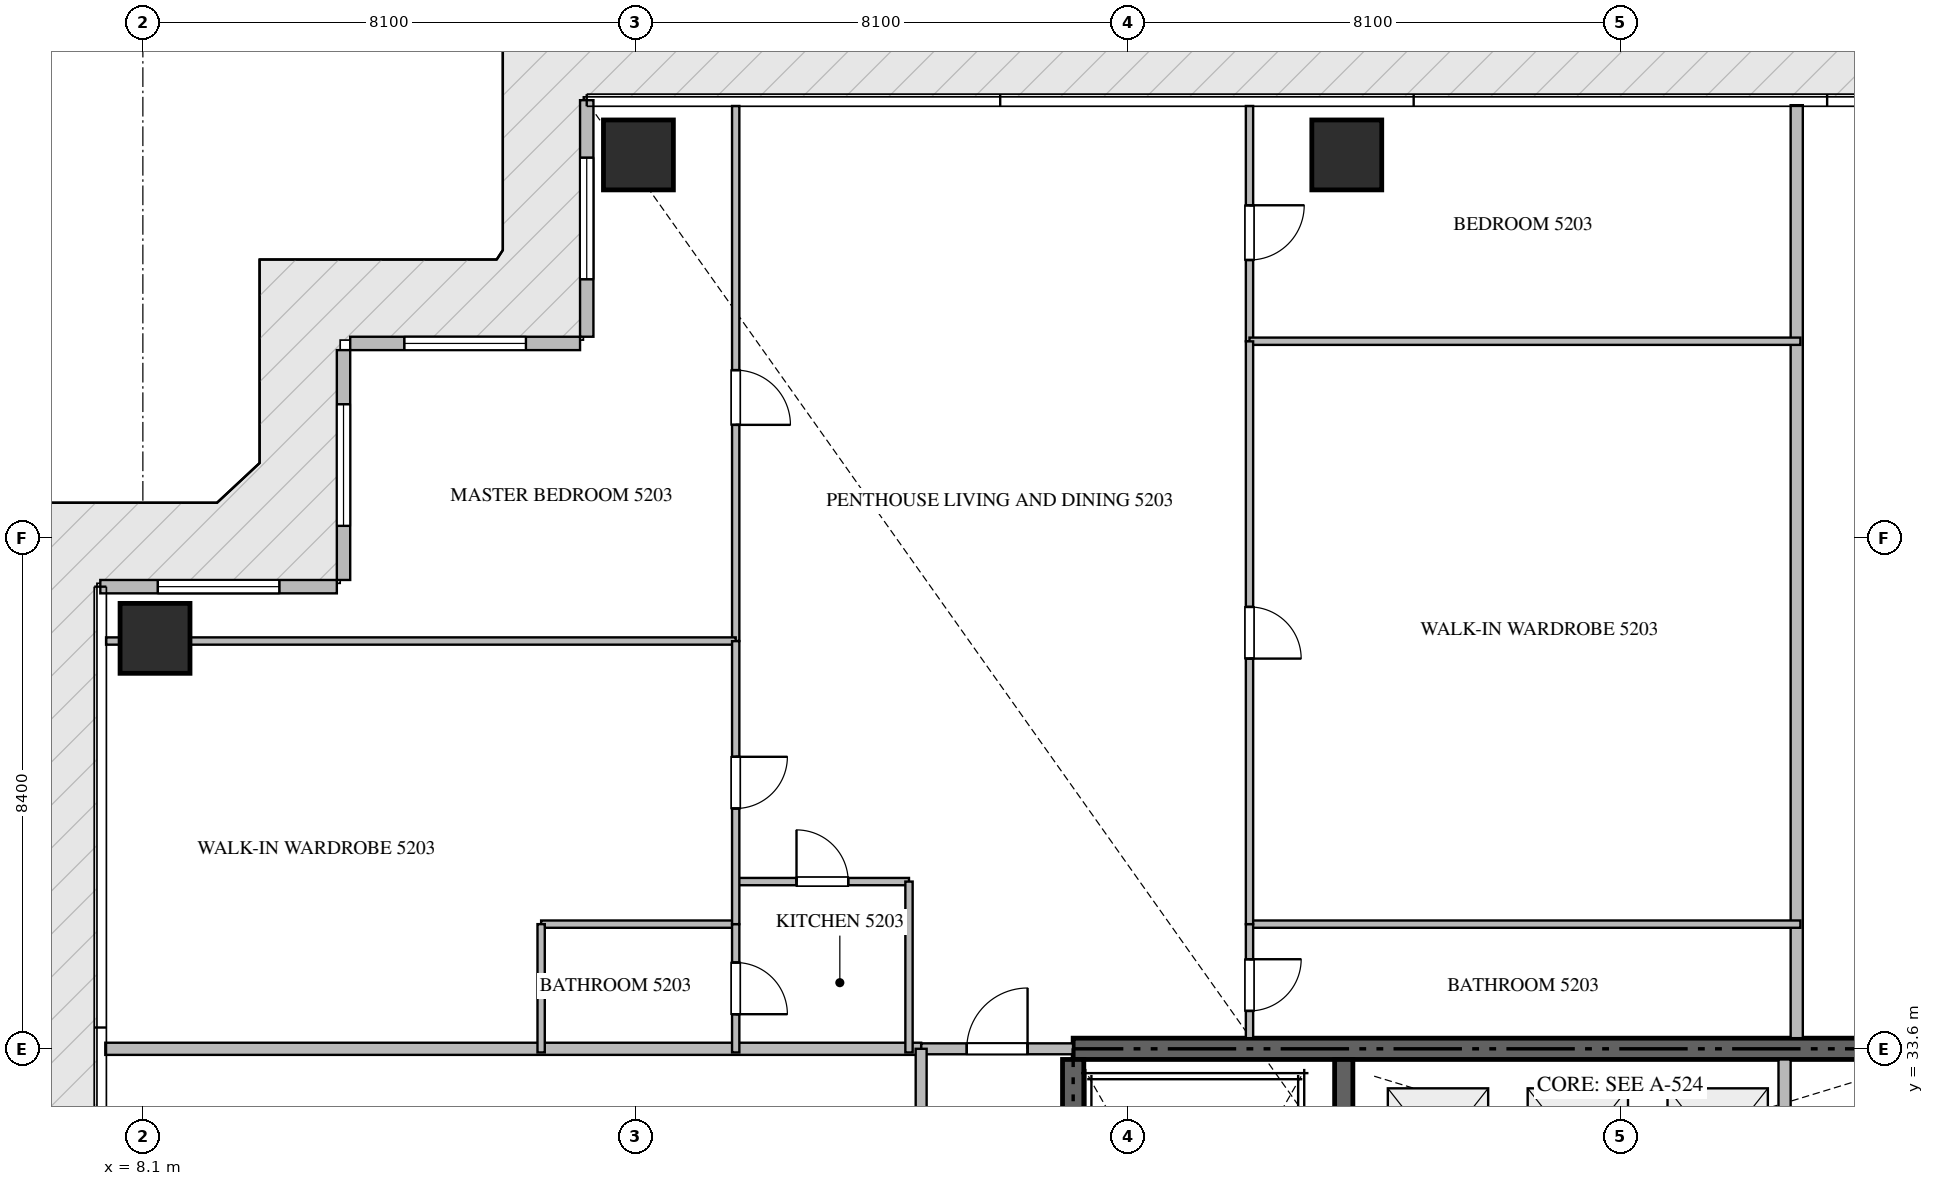
"""IFC4 building model, lengths in metres.
Left out: names, types, materials, properties, quantities, classifications, styles, units other than length and angle.
Written with IfcOpenShell. Run it as: python <this file> out.ifc"""

import sys

from ifc_helpers import new_model, si_unit, direction, frame, frame_2d, origin, origin_2d, place, context, subcontext, project, spatial, rectangle, extrude, source, transform, mapped, element, fill, save


model = new_model("IFC4")
c1 = context("Model", 3, precision=1e-05, world=origin(), true_north=direction((0.0, 1.0)))
c2 = subcontext(c1, "Body", "Model", "MODEL_VIEW")
j1 = project(units=[si_unit("LENGTHUNIT", "METRE"), si_unit("PLANEANGLEUNIT", "RADIAN")], contexts=[c1])
p1 = place(None, origin())
s1 = spatial("IfcSite", under=j1, at=p1, CompositionType="ELEMENT")
p2 = place(p1, origin())
s2 = spatial("IfcBuilding", under=s1, at=p2, CompositionType="ELEMENT")
p3 = place(p2, frame((0.0, 0.0, 210.45)))
s3 = spatial("IfcBuildingStorey", under=s2, at=p3, CompositionType="ELEMENT", Elevation=210.45)
p4 = place(p3, frame((41.4, 33.6, -0.44), z_axis=(0.0, 0.0, 1.0), x_axis=(-1.0, 0.0, 0.0)))
e1 = element("IfcWall", 1, at=p4, inside=s3, PredefinedType="SHEAR", context=c2, shape_type="SweptSolid", body=[
    extrude(rectangle(XDim=18.0, YDim=0.35, at=frame_2d((9.0, 0.0))), origin(), (0.0, 0.0, 1.0), 4.028),
])
p5 = place(p3, frame((23.4, 24.25, -0.44), z_axis=(0.0, 0.0, 1.0), x_axis=(0.0, 1.0, 0.0)))
e2 = element("IfcWall", 2, at=p5, inside=s3, PredefinedType="SHEAR", context=c2, shape_type="SweptSolid", body=[
    extrude(rectangle(XDim=9.175, YDim=0.35, at=frame_2d((4.587, 0.0))), origin(), (0.0, 0.0, 1.0), 4.028),
])
p6 = place(p3, frame((27.85, 23.55, -0.44), z_axis=(0.0, 0.0, 1.0), x_axis=(0.0, 1.0, 0.0)))
e3 = element("IfcWall", 3, at=p6, inside=s3, PredefinedType="SHEAR", context=c2, shape_type="SweptSolid", body=[
    extrude(rectangle(XDim=9.875, YDim=0.3, at=frame_2d((4.938, 0.0))), origin(), (0.0, 0.0, 1.0), 4.028),
])
m1 = source(origin(), c2, "Body", "SweptSolid", [
    extrude(rectangle(XDim=1.15, YDim=1.15, at=origin_2d()), origin(), (0.0, 0.0, 1.0), 4.03),
])
for number, where, z_axis, x_axis in (
    (4, (16.25, 48.3, -0.44), (0.0, 0.0, 1.0), (1.0, 0.0, 0.0)),
    (5, (27.9, 48.3, -0.44), (0.0, 0.0, 1.0), (1.0, 0.0, 0.0)),
    (6, (8.3, 40.35, -0.44), (0.0, 0.0, 1.0), (1.0, 0.0, 0.0)),
):
    element("IfcColumn", number, at=place(p3, frame(where, z_axis=z_axis, x_axis=x_axis)), inside=s3, PredefinedType="COLUMN", context=c2, shape_type="MappedRepresentation", body=[
        mapped(m1, transform((0.0, 0.0, 0.0), scale=1.0)),
    ])
p7 = place(p3, frame((15.4, 49.2, 0.0), z_axis=(0.0, 0.0, 1.0), x_axis=(0.0, -1.0, 0.0)))
e7 = element("IfcWall", 7, at=p7, inside=s3, PredefinedType="ELEMENTEDWALL", context=c2, shape_type="SweptSolid", body=[
    extrude(rectangle(XDim=3.89, YDim=0.22, at=frame_2d((1.945, 0.0))), origin(), (0.0, 0.0, 1.0), 3.575),
])
p8 = place(p7, frame((0.945, 0.0, 0.65)))
e8 = element("IfcOpeningElement", 8, at=p8, cuts=e7, PredefinedType="OPENING", context=c2, shape_type="SweptSolid", body=[
    extrude(rectangle(XDim=2.0, YDim=2.2, at=frame_2d((1.0, 1.1))), frame((0.0, 0.12, 0.0), z_axis=(0.0, -1.0, 0.0), x_axis=(1.0, 0.0, 0.0)), (0.0, 0.0, 1.0), 0.24),
])
p9 = place(p3, frame((15.29, 45.2, 0.0), z_axis=(0.0, 0.0, 1.0), x_axis=(-1.0, 0.0, 0.0)))
e9 = element("IfcWall", 9, at=p9, inside=s3, PredefinedType="ELEMENTEDWALL", context=c2, shape_type="SweptSolid", body=[
    extrude(rectangle(XDim=3.78, YDim=0.22, at=frame_2d((1.89, 0.0))), origin(), (0.0, 0.0, 1.0), 3.575),
])
p10 = place(p9, frame((0.89, 0.0, 0.65)))
e10 = element("IfcOpeningElement", 10, at=p10, cuts=e9, PredefinedType="OPENING", context=c2, shape_type="SweptSolid", body=[
    extrude(rectangle(XDim=2.0, YDim=2.2, at=frame_2d((1.0, 1.1))), frame((0.0, 0.12, 0.0), z_axis=(0.0, -1.0, 0.0), x_axis=(1.0, 0.0, 0.0)), (0.0, 0.0, 1.0), 0.24),
])
p11 = place(p3, frame((11.4, 45.09, 0.0), z_axis=(0.0, 0.0, 1.0), x_axis=(0.0, -1.0, 0.0)))
e11 = element("IfcWall", 11, at=p11, inside=s3, PredefinedType="ELEMENTEDWALL", context=c2, shape_type="SweptSolid", body=[
    extrude(rectangle(XDim=3.78, YDim=0.22, at=frame_2d((1.89, 0.0))), origin(), (0.0, 0.0, 1.0), 3.575),
])
p12 = place(p11, frame((0.89, 0.0, 0.65)))
e12 = element("IfcOpeningElement", 12, at=p12, cuts=e11, PredefinedType="OPENING", context=c2, shape_type="SweptSolid", body=[
    extrude(rectangle(XDim=2.0, YDim=2.2, at=frame_2d((1.0, 1.1))), frame((0.0, 0.12, 0.0), z_axis=(0.0, -1.0, 0.0), x_axis=(1.0, 0.0, 0.0)), (0.0, 0.0, 1.0), 0.24),
])
p13 = place(p3, frame((11.29, 41.2, 0.0), z_axis=(0.0, 0.0, 1.0), x_axis=(-1.0, 0.0, 0.0)))
e13 = element("IfcWall", 13, at=p13, inside=s3, PredefinedType="ELEMENTEDWALL", context=c2, shape_type="SweptSolid", body=[
    extrude(rectangle(XDim=3.89, YDim=0.22, at=frame_2d((1.945, 0.0))), origin(), (0.0, 0.0, 1.0), 3.575),
])
p14 = place(p13, frame((0.945, 0.0, 0.65)))
e14 = element("IfcOpeningElement", 14, at=p14, cuts=e13, PredefinedType="OPENING", context=c2, shape_type="SweptSolid", body=[
    extrude(rectangle(XDim=2.0, YDim=2.2, at=frame_2d((1.0, 1.1))), frame((0.0, 0.12, 0.0), z_axis=(0.0, -1.0, 0.0), x_axis=(1.0, 0.0, 0.0)), (0.0, 0.0, 1.0), 0.24),
])
p15 = place(p3, frame((35.1, 30.75, 0.0), z_axis=(0.0, 0.0, 1.0), x_axis=(0.0, 1.0, 0.0)))
e15 = element("IfcWall", 15, at=p15, inside=s3, PredefinedType="STANDARD", context=c2, shape_type="SweptSolid", body=[
    extrude(rectangle(XDim=2.675, YDim=0.2, at=frame_2d((1.337, 0.0))), origin(), (0.0, 0.0, 1.0), 3.59),
])
p16 = place(p3, frame((35.3, 33.775, 0.0), z_axis=(0.0, 0.0, 1.0), x_axis=(0.0, 1.0, 0.0)))
e16 = element("IfcWall", 16, at=p16, inside=s3, PredefinedType="PARTITIONING", context=c2, shape_type="SweptSolid", body=[
    extrude(rectangle(XDim=15.343, YDim=0.2, at=frame_2d((7.671, 0.0))), origin(), (0.0, 0.0, 1.0), 3.59),
])
p17 = place(p3, frame((7.482, 33.6, 0.0), z_axis=(0.0, 0.0, 1.0), x_axis=(1.0, 0.0, 0.0)))
e17 = element("IfcWall", 17, at=p17, inside=s3, PredefinedType="PARTITIONING", context=c2, shape_type="SweptSolid", body=[
    extrude(rectangle(XDim=13.418, YDim=0.2, at=frame_2d((6.709, 0.0))), origin(), (0.0, 0.0, 1.0), 3.59),
])
p18 = place(p3, frame((20.902, 33.6, 0.0), z_axis=(0.0, 0.0, 1.0), x_axis=(1.0, 0.0, 0.0)))
e18 = element("IfcWall", 18, at=p18, inside=s3, PredefinedType="PARTITIONING", context=c2, shape_type="SweptSolid", body=[
    extrude(rectangle(XDim=2.496, YDim=0.18, at=frame_2d((1.248, 0.0))), origin(), (0.0, 0.0, 1.0), 3.59),
])
p19 = place(p18, frame((0.748, 0.0, 0.0)))
e19 = element("IfcOpeningElement", 19, at=p19, cuts=e18, PredefinedType="OPENING", context=c2, shape_type="SweptSolid", body=[
    extrude(rectangle(XDim=1.0, YDim=2.15, at=frame_2d((0.5, 1.075))), frame((0.0, 0.1, 0.0), z_axis=(0.0, -1.0, 0.0), x_axis=(1.0, 0.0, 0.0)), (0.0, 0.0, 1.0), 0.2),
])
p20 = place(p3, frame((20.9, 16.8, 0.0), z_axis=(0.0, 0.0, 1.0), x_axis=(0.0, 1.0, 0.0)))
e20 = element("IfcWall", 20, at=p20, inside=s3, PredefinedType="PARTITIONING", context=c2, shape_type="SweptSolid", body=[
    extrude(rectangle(XDim=16.8, YDim=0.18, at=frame_2d((8.4, 0.0))), origin(), (0.0, 0.0, 1.0), 3.59),
])
p21 = place(p20, frame((14.5, 0.0, 0.0)))
e21 = element("IfcOpeningElement", 21, at=p21, cuts=e20, PredefinedType="OPENING", context=c2, shape_type="SweptSolid", body=[
    extrude(rectangle(XDim=1.0, YDim=2.15, at=frame_2d((0.5, 1.075))), frame((0.0, 0.1, 0.0), z_axis=(0.0, -1.0, 0.0), x_axis=(1.0, 0.0, 0.0)), (0.0, 0.0, 1.0), 0.2),
])
p22 = place(p3, frame((17.85, 36.35, 0.0), z_axis=(0.0, 0.0, 1.0), x_axis=(1.0, 0.0, 0.0)))
e22 = element("IfcWall", 22, at=p22, inside=s3, PredefinedType="PARTITIONING", context=c2, shape_type="SweptSolid", body=[
    extrude(rectangle(XDim=2.85, YDim=0.12, at=frame_2d((1.425, 0.0))), origin(), (0.0, 0.0, 1.0), 3.59),
])
p23 = place(p22, frame((1.0, 0.0, 0.0)))
e23 = element("IfcOpeningElement", 23, at=p23, cuts=e22, PredefinedType="OPENING", context=c2, shape_type="SweptSolid", body=[
    extrude(rectangle(XDim=0.85, YDim=2.1, at=frame_2d((0.425, 1.05))), frame((0.0, 0.07, 0.0), z_axis=(0.0, -1.0, 0.0), x_axis=(1.0, 0.0, 0.0)), (0.0, 0.0, 1.0), 0.14),
])
p24 = place(p3, frame((20.7, 36.35, 0.0), z_axis=(0.0, 0.0, 1.0), x_axis=(0.0, -1.0, 0.0)))
e24 = element("IfcWall", 24, at=p24, inside=s3, PredefinedType="PARTITIONING", context=c2, shape_type="SweptSolid", body=[
    extrude(rectangle(XDim=2.81, YDim=0.12, at=frame_2d((1.405, 0.0))), origin(), (0.0, 0.0, 1.0), 3.59),
])
p25 = place(p3, frame((17.85, 49.105, 0.0), z_axis=(0.0, 0.0, 1.0), x_axis=(0.0, -1.0, 0.0)))
e25 = element("IfcWall", 25, at=p25, inside=s3, PredefinedType="PARTITIONING", context=c2, shape_type="SweptSolid", body=[
    extrude(rectangle(XDim=8.799, YDim=0.12, at=frame_2d((4.399, 0.0))), origin(), (0.0, 0.0, 1.0), 3.59),
])
p26 = place(p25, frame((4.344, 0.0, 0.0)))
e26 = element("IfcOpeningElement", 26, at=p26, cuts=e25, PredefinedType="OPENING", context=c2, shape_type="SweptSolid", body=[
    extrude(rectangle(XDim=0.9, YDim=2.1, at=frame_2d((0.45, 1.05))), frame((0.0, 0.07, 0.0), z_axis=(0.0, -1.0, 0.0), x_axis=(1.0, 0.0, 0.0)), (0.0, 0.0, 1.0), 0.14),
])
p27 = place(p3, frame((7.495, 40.306, 0.0), z_axis=(0.0, 0.0, 1.0), x_axis=(1.0, 0.0, 0.0)))
e27 = element("IfcWall", 27, at=p27, inside=s3, PredefinedType="PARTITIONING", context=c2, shape_type="SweptSolid", body=[
    extrude(rectangle(XDim=10.355, YDim=0.12, at=frame_2d((5.177, 0.0))), origin(), (0.0, 0.0, 1.0), 3.122),
])
p28 = place(p3, frame((14.65, 35.65, 0.0), z_axis=(0.0, 0.0, 1.0), x_axis=(1.0, 0.0, 0.0)))
e28 = element("IfcWall", 28, at=p28, inside=s3, PredefinedType="PARTITIONING", context=c2, shape_type="SweptSolid", body=[
    extrude(rectangle(XDim=3.2, YDim=0.12, at=frame_2d((1.6, 0.0))), origin(), (0.0, 0.0, 1.0), 3.59),
])
p29 = place(p3, frame((14.65, 35.65, 0.0), z_axis=(0.0, 0.0, 1.0), x_axis=(0.0, -1.0, 0.0)))
e29 = element("IfcWall", 29, at=p29, inside=s3, PredefinedType="PARTITIONING", context=c2, shape_type="SweptSolid", body=[
    extrude(rectangle(XDim=2.11, YDim=0.12, at=frame_2d((1.055, 0.0))), origin(), (0.0, 0.0, 1.0), 3.59),
])
p30 = place(p3, frame((17.85, 40.304, 0.0), z_axis=(0.0, 0.0, 1.0), x_axis=(0.0, -1.0, 0.0)))
e30 = element("IfcWall", 30, at=p30, inside=s3, PredefinedType="PARTITIONING", context=c2, shape_type="SweptSolid", body=[
    extrude(rectangle(XDim=4.654, YDim=0.12, at=frame_2d((2.327, 0.0))), origin(), (0.0, 0.0, 1.0), 3.59),
])
p31 = place(p30, frame((1.902, 0.0, 0.0)))
e31 = element("IfcOpeningElement", 31, at=p31, cuts=e30, PredefinedType="OPENING", context=c2, shape_type="SweptSolid", body=[
    extrude(rectangle(XDim=0.85, YDim=2.1, at=frame_2d((0.425, 1.05))), frame((0.0, 0.07, 0.0), z_axis=(0.0, -1.0, 0.0), x_axis=(1.0, 0.0, 0.0)), (0.0, 0.0, 1.0), 0.14),
])
p32 = place(p3, frame((17.85, 35.648, 0.0), z_axis=(0.0, 0.0, 1.0), x_axis=(0.0, -1.0, 0.0)))
e32 = element("IfcWall", 32, at=p32, inside=s3, PredefinedType="PARTITIONING", context=c2, shape_type="SweptSolid", body=[
    extrude(rectangle(XDim=2.108, YDim=0.12, at=frame_2d((1.054, 0.0))), origin(), (0.0, 0.0, 1.0), 3.59),
])
p33 = place(p32, frame((0.629, 0.0, 0.0)))
e33 = element("IfcOpeningElement", 33, at=p33, cuts=e32, PredefinedType="OPENING", context=c2, shape_type="SweptSolid", body=[
    extrude(rectangle(XDim=0.85, YDim=2.1, at=frame_2d((0.425, 1.05))), frame((0.0, 0.07, 0.0), z_axis=(0.0, -1.0, 0.0), x_axis=(1.0, 0.0, 0.0)), (0.0, 0.0, 1.0), 0.14),
])
p34 = place(p3, frame((26.3, 49.105, 0.0), z_axis=(0.0, 0.0, 1.0), x_axis=(0.0, -1.0, 0.0)))
e34 = element("IfcWall", 34, at=p34, inside=s3, PredefinedType="PARTITIONING", context=c2, shape_type="SweptSolid", body=[
    extrude(rectangle(XDim=3.869, YDim=0.12, at=frame_2d((1.935, 0.0))), origin(), (0.0, 0.0, 1.0), 3.59),
])
p35 = place(p34, frame((1.633, 0.0, 0.0)))
e35 = element("IfcOpeningElement", 35, at=p35, cuts=e34, PredefinedType="OPENING", context=c2, shape_type="SweptSolid", body=[
    extrude(rectangle(XDim=0.9, YDim=2.1, at=frame_2d((0.45, 1.05))), frame((0.0, 0.07, 0.0), z_axis=(0.0, -1.0, 0.0), x_axis=(1.0, 0.0, 0.0)), (0.0, 0.0, 1.0), 0.14),
])
for number, where, z_axis, x_axis in (
    (36, (26.3, 45.236, 0.0), (0.0, 0.0, 1.0), (1.0, 0.0, 0.0)),
    (37, (26.3, 35.65, 0.0), (0.0, 0.0, 1.0), (1.0, 0.0, 0.0)),
):
    element("IfcWall", number, at=place(p3, frame(where, z_axis=z_axis, x_axis=x_axis)), inside=s3, PredefinedType="PARTITIONING", context=c2, shape_type="SweptSolid", body=[
        extrude(rectangle(XDim=9.06, YDim=0.12, at=frame_2d((4.53, 0.0))), origin(), (0.0, 0.0, 1.0), 3.59),
    ])
p36 = place(p3, frame((26.3, 45.234, 0.0), z_axis=(0.0, 0.0, 1.0), x_axis=(0.0, -1.0, 0.0)))
e38 = element("IfcWall", 38, at=p36, inside=s3, PredefinedType="PARTITIONING", context=c2, shape_type="SweptSolid", body=[
    extrude(rectangle(XDim=9.584, YDim=0.12, at=frame_2d((4.792, 0.0))), origin(), (0.0, 0.0, 1.0), 3.59),
])
p37 = place(p36, frame((4.367, 0.0, 0.0)))
e39 = element("IfcOpeningElement", 39, at=p37, cuts=e38, PredefinedType="OPENING", context=c2, shape_type="SweptSolid", body=[
    extrude(rectangle(XDim=0.85, YDim=2.1, at=frame_2d((0.425, 1.05))), frame((0.0, 0.07, 0.0), z_axis=(0.0, -1.0, 0.0), x_axis=(1.0, 0.0, 0.0)), (0.0, 0.0, 1.0), 0.14),
])
p38 = place(p3, frame((26.3, 35.648, 0.0), z_axis=(0.0, 0.0, 1.0), x_axis=(0.0, -1.0, 0.0)))
e40 = element("IfcWall", 40, at=p38, inside=s3, PredefinedType="PARTITIONING", context=c2, shape_type="SweptSolid", body=[
    extrude(rectangle(XDim=1.873, YDim=0.12, at=frame_2d((0.937, 0.0))), origin(), (0.0, 0.0, 1.0), 3.59),
])
p39 = place(p38, frame((0.575, 0.0, 0.0)))
e41 = element("IfcOpeningElement", 41, at=p39, cuts=e40, PredefinedType="OPENING", context=c2, shape_type="SweptSolid", body=[
    extrude(rectangle(XDim=0.85, YDim=2.1, at=frame_2d((0.425, 1.05))), frame((0.0, 0.07, 0.0), z_axis=(0.0, -1.0, 0.0), x_axis=(1.0, 0.0, 0.0)), (0.0, 0.0, 1.0), 0.14),
])
m2 = source(origin(), c2, "Body", "SweptSolid", [
    extrude(rectangle(XDim=2.0, YDim=2.2, at=frame_2d((1.0, 1.1))), frame((0.0, 0.03, 0.0), z_axis=(0.0, -1.0, 0.0), x_axis=(1.0, 0.0, 0.0)), (0.0, 0.0, 1.0), 0.06),
])
p40 = place(p8, origin())
e42 = element("IfcWindow", 42, at=p40, inside=s3, PartitioningType="SINGLE_PANEL", PredefinedType="WINDOW", context=c2, shape_type="MappedRepresentation", body=[
    mapped(m2, transform((0.0, 0.0, 0.0), scale=1.0)),
])
fill(e8, e42)
p41 = place(p10, origin())
e43 = element("IfcWindow", 43, at=p41, inside=s3, PartitioningType="SINGLE_PANEL", PredefinedType="WINDOW", context=c2, shape_type="MappedRepresentation", body=[
    mapped(m2, transform((0.0, 0.0, 0.0), scale=1.0)),
])
fill(e10, e43)
p42 = place(p12, origin())
e44 = element("IfcWindow", 44, at=p42, inside=s3, PartitioningType="SINGLE_PANEL", PredefinedType="WINDOW", context=c2, shape_type="MappedRepresentation", body=[
    mapped(m2, transform((0.0, 0.0, 0.0), scale=1.0)),
])
fill(e12, e44)
p43 = place(p14, origin())
e45 = element("IfcWindow", 45, at=p43, inside=s3, PartitioningType="SINGLE_PANEL", PredefinedType="WINDOW", context=c2, shape_type="MappedRepresentation", body=[
    mapped(m2, transform((0.0, 0.0, 0.0), scale=1.0)),
])
fill(e14, e45)
m3 = source(origin(), c2, "Body", "SweptSolid", [
    extrude(rectangle(XDim=1.0, YDim=2.15, at=frame_2d((0.5, 1.075))), frame((0.0, 0.025, 0.0), z_axis=(0.0, -1.0, 0.0), x_axis=(1.0, 0.0, 0.0)), (0.0, 0.0, 1.0), 0.05),
])
p44 = place(p19, origin())
e46 = element("IfcDoor", 46, at=p44, inside=s3, OperationType="SINGLE_SWING_RIGHT", PredefinedType="DOOR", context=c2, shape_type="MappedRepresentation", body=[
    mapped(m3, transform((0.0, 0.0, 0.0), scale=1.0)),
])
fill(e19, e46)
m4 = source(origin(), c2, "Body", "SweptSolid", [
    extrude(rectangle(XDim=0.85, YDim=2.1, at=frame_2d((0.425, 1.05))), frame((0.0, 0.025, 0.0), z_axis=(0.0, -1.0, 0.0), x_axis=(1.0, 0.0, 0.0)), (0.0, 0.0, 1.0), 0.05),
])
p45 = place(p23, origin())
e47 = element("IfcDoor", 47, at=p45, inside=s3, OperationType="SINGLE_SWING_LEFT", PredefinedType="DOOR", context=c2, shape_type="MappedRepresentation", body=[
    mapped(m4, transform((0.0, 0.0, 0.0), scale=1.0)),
])
fill(e23, e47)
m5 = source(origin(), c2, "Body", "SweptSolid", [
    extrude(rectangle(XDim=0.9, YDim=2.1, at=frame_2d((0.45, 1.05))), frame((0.0, 0.025, 0.0), z_axis=(0.0, -1.0, 0.0), x_axis=(1.0, 0.0, 0.0)), (0.0, 0.0, 1.0), 0.05),
])
p46 = place(p26, origin())
e48 = element("IfcDoor", 48, at=p46, inside=s3, OperationType="SINGLE_SWING_RIGHT", PredefinedType="DOOR", context=c2, shape_type="MappedRepresentation", body=[
    mapped(m5, transform((0.0, 0.0, 0.0), scale=1.0)),
])
fill(e26, e48)
p47 = place(p31, origin())
e49 = element("IfcDoor", 49, at=p47, inside=s3, OperationType="SINGLE_SWING_LEFT", PredefinedType="DOOR", context=c2, shape_type="MappedRepresentation", body=[
    mapped(m4, transform((0.0, 0.0, 0.0), scale=1.0)),
])
fill(e31, e49)
p48 = place(p33, origin())
e50 = element("IfcDoor", 50, at=p48, inside=s3, OperationType="SINGLE_SWING_RIGHT", PredefinedType="DOOR", context=c2, shape_type="MappedRepresentation", body=[
    mapped(m4, transform((0.0, 0.0, 0.0), scale=1.0)),
])
fill(e33, e50)
p49 = place(p35, origin())
e51 = element("IfcDoor", 51, at=p49, inside=s3, OperationType="SINGLE_SWING_LEFT", PredefinedType="DOOR", context=c2, shape_type="MappedRepresentation", body=[
    mapped(m5, transform((0.0, 0.0, 0.0), scale=1.0)),
])
fill(e35, e51)
p50 = place(p37, origin())
e52 = element("IfcDoor", 52, at=p50, inside=s3, OperationType="SINGLE_SWING_RIGHT", PredefinedType="DOOR", context=c2, shape_type="MappedRepresentation", body=[
    mapped(m4, transform((0.0, 0.0, 0.0), scale=1.0)),
])
fill(e39, e52)
p51 = place(p39, origin())
e53 = element("IfcDoor", 53, at=p51, inside=s3, OperationType="SINGLE_SWING_LEFT", PredefinedType="DOOR", context=c2, shape_type="MappedRepresentation", body=[
    mapped(m4, transform((0.0, 0.0, 0.0), scale=1.0)),
])
fill(e41, e53)
save(model, sys.argv[1])
